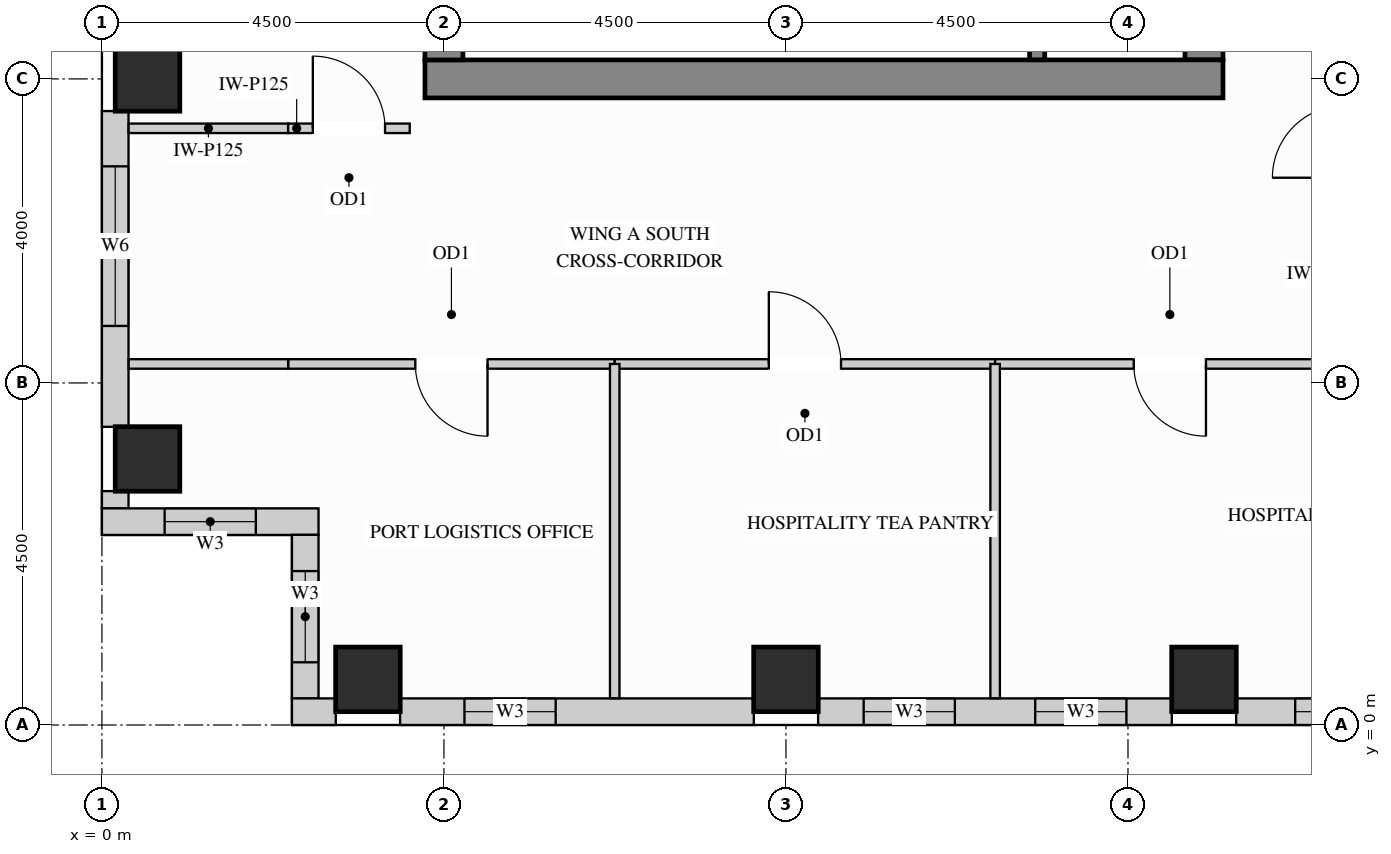
"""IFC4 building model, lengths in metres.
Left out: names, types, materials, properties, quantities, classifications, styles, units other than length and angle.
Written with IfcOpenShell. Run it as: python <this file> out.ifc"""

import sys

from ifc_helpers import new_model, si_unit, direction, frame, frame_2d, origin, origin_2d, place, context, subcontext, project, spatial, rectangle, extrude, source, transform, mapped, element, fill, save


model = new_model("IFC4")
c1 = context("Model", 3, precision=1e-05, world=origin(), true_north=direction((0.0, 1.0)))
c2 = subcontext(c1, "Body", "Model", "MODEL_VIEW")
j1 = project(units=[si_unit("LENGTHUNIT", "METRE"), si_unit("PLANEANGLEUNIT", "RADIAN")], contexts=[c1])
p1 = place(None, origin())
s1 = spatial("IfcSite", under=j1, at=p1, CompositionType="ELEMENT")
p2 = place(p1, origin())
s2 = spatial("IfcBuilding", under=s1, at=p2, CompositionType="ELEMENT")
p3 = place(p2, frame((0.0, 0.0, 270.0)))
s3 = spatial("IfcBuildingStorey", under=s2, at=p3, CompositionType="ELEMENT", Elevation=270.0)
m1 = source(origin(), c2, "Body", "SweptSolid", [
    extrude(rectangle(XDim=0.85, YDim=0.85, at=origin_2d()), origin(), (0.0, 0.0, 1.0), 3.4),
])
for number, where, z_axis, x_axis in (
    (1, (14.5, 0.6, 0.0), (0.0, 0.0, 1.0), (1.0, 0.0, 0.0)),
    (2, (3.5, 0.6, 0.0), (0.0, 0.0, 1.0), (1.0, 0.0, 0.0)),
    (3, (9.0, 0.6, 0.0), (0.0, 0.0, 1.0), (1.0, 0.0, 0.0)),
    (4, (0.6, 3.5, 0.0), (0.0, 0.0, 1.0), (1.0, 0.0, 0.0)),
    (5, (0.6, 8.5, 0.0), (0.0, 0.0, 1.0), (1.0, 0.0, 0.0)),
):
    element("IfcColumn", number, at=place(p3, frame(where, z_axis=z_axis, x_axis=x_axis)), inside=s3, PredefinedType="COLUMN", context=c2, shape_type="MappedRepresentation", body=[
        mapped(m1, transform((0.0, 0.0, 0.0), x_axis=(1.0, 0.0, 0.0), y_axis=(0.0, 1.0, 0.0), z_axis=(0.0, 0.0, 1.0))),
    ])
m2 = source(origin(), c2, "Body", "SweptSolid", [
    extrude(rectangle(XDim=10.07, YDim=0.5, at=frame_2d((5.035, 0.0))), origin(), (0.0, 0.0, 1.0), 3.4),
])
p4 = place(p3, frame((14.5, 8.75, 0.0), z_axis=(0.0, 0.0, 1.0), x_axis=(0.0, 1.0, 0.0)))
e6 = element("IfcWall", 6, at=p4, inside=s3, PredefinedType="SHEAR", context=c2, shape_type="MappedRepresentation", body=[
    mapped(m2, transform((0.0, 0.0, 0.0), x_axis=(1.0, 0.0, 0.0), y_axis=(0.0, 1.0, 0.0), z_axis=(0.0, 0.0, 1.0))),
])
m3 = source(origin(), c2, "Body", "SweptSolid", [
    extrude(rectangle(XDim=10.5, YDim=0.5, at=frame_2d((5.25, 0.0))), origin(), (0.0, 0.0, 1.0), 3.4),
])
p5 = place(p3, frame((4.25, 8.5, 0.0), z_axis=(0.0, 0.0, 1.0), x_axis=(1.0, 0.0, 0.0)))
e7 = element("IfcWall", 7, at=p5, inside=s3, PredefinedType="SHEAR", context=c2, shape_type="MappedRepresentation", body=[
    mapped(m3, transform((0.0, 0.0, 0.0), x_axis=(1.0, 0.0, 0.0), y_axis=(0.0, 1.0, 0.0), z_axis=(0.0, 0.0, 1.0))),
])
m4 = source(origin(), c2, "Body", "SweptSolid", [
    extrude(rectangle(XDim=20.5, YDim=0.5, at=frame_2d((10.25, 0.0))), origin(), (0.0, 0.0, 1.0), 3.4),
])
p6 = place(p3, frame((4.5, 8.75, 0.0), z_axis=(0.0, 0.0, 1.0), x_axis=(0.0, 1.0, 0.0)))
e8 = element("IfcWall", 8, at=p6, inside=s3, PredefinedType="SHEAR", context=c2, shape_type="MappedRepresentation", body=[
    mapped(m4, transform((0.0, 0.0, 0.0), x_axis=(1.0, 0.0, 0.0), y_axis=(0.0, 1.0, 0.0), z_axis=(0.0, 0.0, 1.0))),
])
p7 = place(p3, frame((0.175, 8.077, 0.0), z_axis=(0.0, 0.0, 1.0), x_axis=(0.0, -1.0, 0.0)))
e9 = element("IfcWall", 9, at=p7, inside=s3, PredefinedType="SOLIDWALL", context=c2, shape_type="SweptSolid", body=[
    extrude(rectangle(XDim=4.154, YDim=0.35, at=frame_2d((2.077, 0.0))), origin(), (0.0, 0.0, 1.0), 3.385),
])
p8 = place(p7, frame((0.727, 0.0, 0.78)))
e10 = element("IfcOpeningElement", 10, at=p8, cuts=e9, PredefinedType="OPENING", context=c2, shape_type="SweptSolid", body=[
    extrude(rectangle(XDim=2.1, YDim=2.25, at=frame_2d((1.05, 1.125))), frame((0.0, 0.185, 0.0), z_axis=(0.0, -1.0, 0.0), x_axis=(1.0, 0.0, 0.0)), (0.0, 0.0, 1.0), 0.37),
])
m5 = source(origin(), c2, "Body", "SweptSolid", [
    extrude(rectangle(XDim=0.229, YDim=0.35, at=frame_2d((0.115, 0.0))), origin(), (0.0, 0.0, 1.0), 3.385),
])
p9 = place(p3, frame((0.175, 3.077, 0.0), z_axis=(0.0, 0.0, 1.0), x_axis=(0.0, -1.0, 0.0)))
e11 = element("IfcWall", 11, at=p9, inside=s3, PredefinedType="SOLIDWALL", context=c2, shape_type="MappedRepresentation", body=[
    mapped(m5, transform((0.0, 0.0, 0.0), x_axis=(1.0, 0.0, 0.0), y_axis=(0.0, 1.0, 0.0), z_axis=(0.0, 0.0, 1.0))),
])
p10 = place(p3, frame((0.0, 2.675, 0.0), z_axis=(0.0, 0.0, 1.0), x_axis=(1.0, 0.0, 0.0)))
e12 = element("IfcWall", 12, at=p10, inside=s3, PredefinedType="SOLIDWALL", context=c2, shape_type="SweptSolid", body=[
    extrude(rectangle(XDim=2.85, YDim=0.35, at=frame_2d((1.425, 0.0))), origin(), (0.0, 0.0, 1.0), 3.385),
])
p11 = place(p10, frame((0.825, 0.0, 0.78)))
e13 = element("IfcOpeningElement", 13, at=p11, cuts=e12, PredefinedType="OPENING", context=c2, shape_type="SweptSolid", body=[
    extrude(rectangle(XDim=1.2, YDim=2.25, at=frame_2d((0.6, 1.125))), frame((0.0, 0.185, 0.0), z_axis=(0.0, -1.0, 0.0), x_axis=(1.0, 0.0, 0.0)), (0.0, 0.0, 1.0), 0.37),
])
p12 = place(p3, frame((2.675, 2.502, 0.0), z_axis=(0.0, 0.0, 1.0), x_axis=(0.0, -1.0, 0.0)))
e14 = element("IfcWall", 14, at=p12, inside=s3, PredefinedType="SOLIDWALL", context=c2, shape_type="SweptSolid", body=[
    extrude(rectangle(XDim=2.154, YDim=0.35, at=frame_2d((1.077, 0.0))), origin(), (0.0, 0.0, 1.0), 3.385),
])
p13 = place(p12, frame((0.477, 0.0, 0.78)))
e15 = element("IfcOpeningElement", 15, at=p13, cuts=e14, PredefinedType="OPENING", context=c2, shape_type="SweptSolid", body=[
    extrude(rectangle(XDim=1.2, YDim=2.25, at=frame_2d((0.6, 1.125))), frame((0.0, 0.185, 0.0), z_axis=(0.0, -1.0, 0.0), x_axis=(1.0, 0.0, 0.0)), (0.0, 0.0, 1.0), 0.37),
])
m6 = source(origin(), c2, "Body", "SweptSolid", [
    extrude(rectangle(XDim=0.577, YDim=0.35, at=frame_2d((0.289, 0.0))), origin(), (0.0, 0.0, 1.0), 3.385),
])
p14 = place(p3, frame((2.5, 0.175, 0.0), z_axis=(0.0, 0.0, 1.0), x_axis=(1.0, 0.0, 0.0)))
e16 = element("IfcWall", 16, at=p14, inside=s3, PredefinedType="SOLIDWALL", context=c2, shape_type="MappedRepresentation", body=[
    mapped(m6, transform((0.0, 0.0, 0.0), x_axis=(1.0, 0.0, 0.0), y_axis=(0.0, 1.0, 0.0), z_axis=(0.0, 0.0, 1.0))),
])
p15 = place(p3, frame((3.923, 0.175, 0.0), z_axis=(0.0, 0.0, 1.0), x_axis=(1.0, 0.0, 0.0)))
e17 = element("IfcWall", 17, at=p15, inside=s3, PredefinedType="SOLIDWALL", context=c2, shape_type="SweptSolid", body=[
    extrude(rectangle(XDim=4.654, YDim=0.35, at=frame_2d((2.327, 0.0))), origin(), (0.0, 0.0, 1.0), 3.385),
])
p16 = place(p15, frame((0.847, 0.0, 0.78)))
e18 = element("IfcOpeningElement", 18, at=p16, cuts=e17, PredefinedType="OPENING", context=c2, shape_type="SweptSolid", body=[
    extrude(rectangle(XDim=1.2, YDim=2.25, at=frame_2d((0.6, 1.125))), frame((0.0, 0.185, 0.0), z_axis=(0.0, -1.0, 0.0), x_axis=(1.0, 0.0, 0.0)), (0.0, 0.0, 1.0), 0.37),
])
p17 = place(p3, frame((9.423, 0.175, 0.0), z_axis=(0.0, 0.0, 1.0), x_axis=(1.0, 0.0, 0.0)))
e19 = element("IfcWall", 19, at=p17, inside=s3, PredefinedType="SOLIDWALL", context=c2, shape_type="SweptSolid", body=[
    extrude(rectangle(XDim=4.654, YDim=0.35, at=frame_2d((2.327, 0.0))), origin(), (0.0, 0.0, 1.0), 3.385),
])
p18 = place(p17, frame((0.6, 0.0, 0.78)))
e20 = element("IfcOpeningElement", 20, at=p18, cuts=e19, PredefinedType="OPENING", context=c2, shape_type="SweptSolid", body=[
    extrude(rectangle(XDim=1.2, YDim=2.25, at=frame_2d((0.6, 1.125))), frame((0.0, 0.185, 0.0), z_axis=(0.0, -1.0, 0.0), x_axis=(1.0, 0.0, 0.0)), (0.0, 0.0, 1.0), 0.37),
])
p19 = place(p17, frame((2.856, 0.0, 0.78)))
e21 = element("IfcOpeningElement", 21, at=p19, cuts=e19, PredefinedType="OPENING", context=c2, shape_type="SweptSolid", body=[
    extrude(rectangle(XDim=1.2, YDim=2.25, at=frame_2d((0.6, 1.125))), frame((0.0, 0.185, 0.0), z_axis=(0.0, -1.0, 0.0), x_axis=(1.0, 0.0, 0.0)), (0.0, 0.0, 1.0), 0.37),
])
p20 = place(p3, frame((14.923, 0.175, 0.0), z_axis=(0.0, 0.0, 1.0), x_axis=(1.0, 0.0, 0.0)))
e22 = element("IfcWall", 22, at=p20, inside=s3, PredefinedType="SOLIDWALL", context=c2, shape_type="SweptSolid", body=[
    extrude(rectangle(XDim=3.654, YDim=0.35, at=frame_2d((1.827, 0.0))), origin(), (0.0, 0.0, 1.0), 3.385),
])
p21 = place(p20, frame((0.777, 0.0, 0.78)))
e23 = element("IfcOpeningElement", 23, at=p21, cuts=e22, PredefinedType="OPENING", context=c2, shape_type="SweptSolid", body=[
    extrude(rectangle(XDim=2.1, YDim=2.25, at=frame_2d((1.05, 1.125))), frame((0.0, 0.185, 0.0), z_axis=(0.0, -1.0, 0.0), x_axis=(1.0, 0.0, 0.0)), (0.0, 0.0, 1.0), 0.37),
])
m7 = source(origin(), c2, "Body", "SweptSolid", [
    extrude(rectangle(XDim=2.098, YDim=0.125, at=frame_2d((1.049, 0.0))), origin(), (0.0, 0.0, 1.0), 3.385),
])
p22 = place(p3, frame((0.352, 7.85, 0.0), z_axis=(0.0, 0.0, 1.0), x_axis=(1.0, 0.0, 0.0)))
e24 = element("IfcWall", 24, at=p22, inside=s3, PredefinedType="PARTITIONING", context=c2, shape_type="MappedRepresentation", body=[
    mapped(m7, transform((0.0, 0.0, 0.0), x_axis=(1.0, 0.0, 0.0), y_axis=(0.0, 1.0, 0.0), z_axis=(0.0, 0.0, 1.0))),
])
p23 = place(p3, frame((2.45, 7.85, 0.0), z_axis=(0.0, 0.0, 1.0), x_axis=(1.0, 0.0, 0.0)))
e25 = element("IfcWall", 25, at=p23, inside=s3, PredefinedType="PARTITIONING", context=c2, shape_type="SweptSolid", body=[
    extrude(rectangle(XDim=1.6, YDim=0.125, at=frame_2d((0.8, 0.0))), origin(), (0.0, 0.0, 1.0), 3.385),
])
p24 = place(p23, frame((0.325, 0.0, 0.0)))
e26 = element("IfcOpeningElement", 26, at=p24, cuts=e25, PredefinedType="OPENING", context=c2, shape_type="SweptSolid", body=[
    extrude(rectangle(XDim=0.95, YDim=2.15, at=frame_2d((0.475, 1.075))), frame((0.0, 0.073, 0.0), z_axis=(0.0, -1.0, 0.0), x_axis=(1.0, 0.0, 0.0)), (0.0, 0.0, 1.0), 0.145),
])
p25 = place(p3, frame((2.45, 4.75, 0.0), z_axis=(0.0, 0.0, 1.0), x_axis=(1.0, 0.0, 0.0)))
e27 = element("IfcWall", 27, at=p25, inside=s3, PredefinedType="PARTITIONING", context=c2, shape_type="SweptSolid", body=[
    extrude(rectangle(XDim=4.297, YDim=0.125, at=frame_2d((2.148, 0.0))), origin(), (0.0, 0.0, 1.0), 2.848),
])
p26 = place(p25, frame((1.674, 0.0, 0.0)))
e28 = element("IfcOpeningElement", 28, at=p26, cuts=e27, PredefinedType="OPENING", context=c2, shape_type="SweptSolid", body=[
    extrude(rectangle(XDim=0.95, YDim=2.15, at=frame_2d((0.475, 1.075))), frame((0.0, 0.073, 0.0), z_axis=(0.0, -1.0, 0.0), x_axis=(1.0, 0.0, 0.0)), (0.0, 0.0, 1.0), 0.145),
])
p27 = place(p3, frame((6.747, 4.75, 0.0), z_axis=(0.0, 0.0, 1.0), x_axis=(1.0, 0.0, 0.0)))
e29 = element("IfcWall", 29, at=p27, inside=s3, PredefinedType="PARTITIONING", context=c2, shape_type="SweptSolid", body=[
    extrude(rectangle(XDim=5.005, YDim=0.125, at=frame_2d((2.502, 0.0))), origin(), (0.0, 0.0, 1.0), 2.848),
])
p28 = place(p27, frame((2.028, 0.0, 0.0)))
e30 = element("IfcOpeningElement", 30, at=p28, cuts=e29, PredefinedType="OPENING", context=c2, shape_type="SweptSolid", body=[
    extrude(rectangle(XDim=0.95, YDim=2.15, at=frame_2d((0.475, 1.075))), frame((0.0, 0.073, 0.0), z_axis=(0.0, -1.0, 0.0), x_axis=(1.0, 0.0, 0.0)), (0.0, 0.0, 1.0), 0.145),
])
p29 = place(p3, frame((11.752, 4.75, 0.0), z_axis=(0.0, 0.0, 1.0), x_axis=(1.0, 0.0, 0.0)))
e31 = element("IfcWall", 31, at=p29, inside=s3, PredefinedType="PARTITIONING", context=c2, shape_type="SweptSolid", body=[
    extrude(rectangle(XDim=4.598, YDim=0.125, at=frame_2d((2.299, 0.0))), origin(), (0.0, 0.0, 1.0), 2.848),
])
p30 = place(p29, frame((1.824, 0.0, 0.0)))
e32 = element("IfcOpeningElement", 32, at=p30, cuts=e31, PredefinedType="OPENING", context=c2, shape_type="SweptSolid", body=[
    extrude(rectangle(XDim=0.95, YDim=2.15, at=frame_2d((0.475, 1.075))), frame((0.0, 0.073, 0.0), z_axis=(0.0, -1.0, 0.0), x_axis=(1.0, 0.0, 0.0)), (0.0, 0.0, 1.0), 0.145),
])
m8 = source(origin(), c2, "Body", "SweptSolid", [
    extrude(rectangle(XDim=2.098, YDim=0.125, at=frame_2d((1.049, 0.0))), origin(), (0.0, 0.0, 1.0), 2.848),
])
p31 = place(p3, frame((0.352, 4.75, 0.0), z_axis=(0.0, 0.0, 1.0), x_axis=(1.0, 0.0, 0.0)))
e33 = element("IfcWall", 33, at=p31, inside=s3, PredefinedType="PARTITIONING", context=c2, shape_type="MappedRepresentation", body=[
    mapped(m8, transform((0.0, 0.0, 0.0), x_axis=(1.0, 0.0, 0.0), y_axis=(0.0, 1.0, 0.0), z_axis=(0.0, 0.0, 1.0))),
])
m9 = source(origin(), c2, "Body", "SweptSolid", [
    extrude(rectangle(XDim=4.398, YDim=0.125, at=frame_2d((2.199, 0.0))), origin(), (0.0, 0.0, 1.0), 3.385),
])
for number, where, z_axis, x_axis in (
    (34, (6.747, 0.352, 0.0), (0.0, 0.0, 1.0), (0.0, 1.0, 0.0)),
    (35, (11.752, 0.352, 0.0), (0.0, 0.0, 1.0), (0.0, 1.0, 0.0)),
):
    element("IfcWall", number, at=place(p3, frame(where, z_axis=z_axis, x_axis=x_axis)), inside=s3, PredefinedType="PARTITIONING", context=c2, shape_type="MappedRepresentation", body=[
        mapped(m9, transform((0.0, 0.0, 0.0), x_axis=(1.0, 0.0, 0.0), y_axis=(0.0, 1.0, 0.0), z_axis=(0.0, 0.0, 1.0))),
    ])
m10 = source(origin(), c2, "Body", "SweptSolid", [
    extrude(rectangle(XDim=3.803, YDim=0.2, at=frame_2d((1.901, 0.0))), origin(), (0.0, 0.0, 1.0), 3.4),
])
p32 = place(p3, frame((12.305, 8.752, 0.0), z_axis=(0.0, 0.0, 1.0), x_axis=(0.0, 1.0, 0.0)))
e36 = element("IfcWall", 36, at=p32, inside=s3, PredefinedType="SHEAR", context=c2, shape_type="MappedRepresentation", body=[
    mapped(m10, transform((0.0, 0.0, 0.0), x_axis=(1.0, 0.0, 0.0), y_axis=(0.0, 1.0, 0.0), z_axis=(0.0, 0.0, 1.0))),
])
m11 = source(origin(), c2, "Body", "SweptSolid", [
    extrude(rectangle(XDim=0.95, YDim=2.15, at=frame_2d((0.475, 1.075))), frame((0.0, 0.025, 0.0), z_axis=(0.0, -1.0, 0.0), x_axis=(1.0, 0.0, 0.0)), (0.0, 0.0, 1.0), 0.05),
])
p33 = place(p26, origin())
e37 = element("IfcDoor", 37, at=p33, inside=s3, OperationType="SINGLE_SWING_RIGHT", PredefinedType="DOOR", context=c2, shape_type="MappedRepresentation", body=[
    mapped(m11, transform((0.0, 0.0, 0.0), x_axis=(1.0, 0.0, 0.0), y_axis=(0.0, 1.0, 0.0), z_axis=(0.0, 0.0, 1.0))),
])
fill(e28, e37)
p34 = place(p28, origin())
e38 = element("IfcDoor", 38, at=p34, inside=s3, OperationType="SINGLE_SWING_LEFT", PredefinedType="DOOR", context=c2, shape_type="MappedRepresentation", body=[
    mapped(m11, transform((0.0, 0.0, 0.0), x_axis=(1.0, 0.0, 0.0), y_axis=(0.0, 1.0, 0.0), z_axis=(0.0, 0.0, 1.0))),
])
fill(e30, e38)
p35 = place(p30, origin())
e39 = element("IfcDoor", 39, at=p35, inside=s3, OperationType="SINGLE_SWING_RIGHT", PredefinedType="DOOR", context=c2, shape_type="MappedRepresentation", body=[
    mapped(m11, transform((0.0, 0.0, 0.0), x_axis=(1.0, 0.0, 0.0), y_axis=(0.0, 1.0, 0.0), z_axis=(0.0, 0.0, 1.0))),
])
fill(e32, e39)
p36 = place(p24, origin())
e40 = element("IfcDoor", 40, at=p36, inside=s3, OperationType="SINGLE_SWING_LEFT", PredefinedType="DOOR", context=c2, shape_type="MappedRepresentation", body=[
    mapped(m11, transform((0.0, 0.0, 0.0), x_axis=(1.0, 0.0, 0.0), y_axis=(0.0, 1.0, 0.0), z_axis=(0.0, 0.0, 1.0))),
])
fill(e26, e40)
m12 = source(origin(), c2, "Body", "SweptSolid", [
    extrude(rectangle(XDim=1.2, YDim=2.25, at=frame_2d((0.6, 1.125))), frame((0.0, 0.03, 0.0), z_axis=(0.0, -1.0, 0.0), x_axis=(1.0, 0.0, 0.0)), (0.0, 0.0, 1.0), 0.06),
])
p37 = place(p11, origin())
e41 = element("IfcWindow", 41, at=p37, inside=s3, PartitioningType="SINGLE_PANEL", PredefinedType="WINDOW", context=c2, shape_type="MappedRepresentation", body=[
    mapped(m12, transform((0.0, 0.0, 0.0), x_axis=(1.0, 0.0, 0.0), y_axis=(0.0, 1.0, 0.0), z_axis=(0.0, 0.0, 1.0))),
])
fill(e13, e41)
p38 = place(p13, origin())
e42 = element("IfcWindow", 42, at=p38, inside=s3, PartitioningType="SINGLE_PANEL", PredefinedType="WINDOW", context=c2, shape_type="MappedRepresentation", body=[
    mapped(m12, transform((0.0, 0.0, 0.0), x_axis=(1.0, 0.0, 0.0), y_axis=(0.0, 1.0, 0.0), z_axis=(0.0, 0.0, 1.0))),
])
fill(e15, e42)
p39 = place(p16, origin())
e43 = element("IfcWindow", 43, at=p39, inside=s3, PartitioningType="SINGLE_PANEL", PredefinedType="WINDOW", context=c2, shape_type="MappedRepresentation", body=[
    mapped(m12, transform((0.0, 0.0, 0.0), x_axis=(1.0, 0.0, 0.0), y_axis=(0.0, 1.0, 0.0), z_axis=(0.0, 0.0, 1.0))),
])
fill(e18, e43)
p40 = place(p18, origin())
e44 = element("IfcWindow", 44, at=p40, inside=s3, PartitioningType="SINGLE_PANEL", PredefinedType="WINDOW", context=c2, shape_type="MappedRepresentation", body=[
    mapped(m12, transform((0.0, 0.0, 0.0), x_axis=(1.0, 0.0, 0.0), y_axis=(0.0, 1.0, 0.0), z_axis=(0.0, 0.0, 1.0))),
])
fill(e20, e44)
p41 = place(p19, origin())
e45 = element("IfcWindow", 45, at=p41, inside=s3, PartitioningType="SINGLE_PANEL", PredefinedType="WINDOW", context=c2, shape_type="MappedRepresentation", body=[
    mapped(m12, transform((0.0, 0.0, 0.0), x_axis=(1.0, 0.0, 0.0), y_axis=(0.0, 1.0, 0.0), z_axis=(0.0, 0.0, 1.0))),
])
fill(e21, e45)
m13 = source(origin(), c2, "Body", "SweptSolid", [
    extrude(rectangle(XDim=2.1, YDim=2.25, at=frame_2d((1.05, 1.125))), frame((0.0, 0.03, 0.0), z_axis=(0.0, -1.0, 0.0), x_axis=(1.0, 0.0, 0.0)), (0.0, 0.0, 1.0), 0.06),
])
p42 = place(p8, origin())
e46 = element("IfcWindow", 46, at=p42, inside=s3, PartitioningType="SINGLE_PANEL", PredefinedType="WINDOW", context=c2, shape_type="MappedRepresentation", body=[
    mapped(m13, transform((0.0, 0.0, 0.0), x_axis=(1.0, 0.0, 0.0), y_axis=(0.0, 1.0, 0.0), z_axis=(0.0, 0.0, 1.0))),
])
fill(e10, e46)
p43 = place(p21, origin())
e47 = element("IfcWindow", 47, at=p43, inside=s3, PartitioningType="SINGLE_PANEL", PredefinedType="WINDOW", context=c2, shape_type="MappedRepresentation", body=[
    mapped(m13, transform((0.0, 0.0, 0.0), x_axis=(1.0, 0.0, 0.0), y_axis=(0.0, 1.0, 0.0), z_axis=(0.0, 0.0, 1.0))),
])
fill(e23, e47)
save(model, sys.argv[1])
